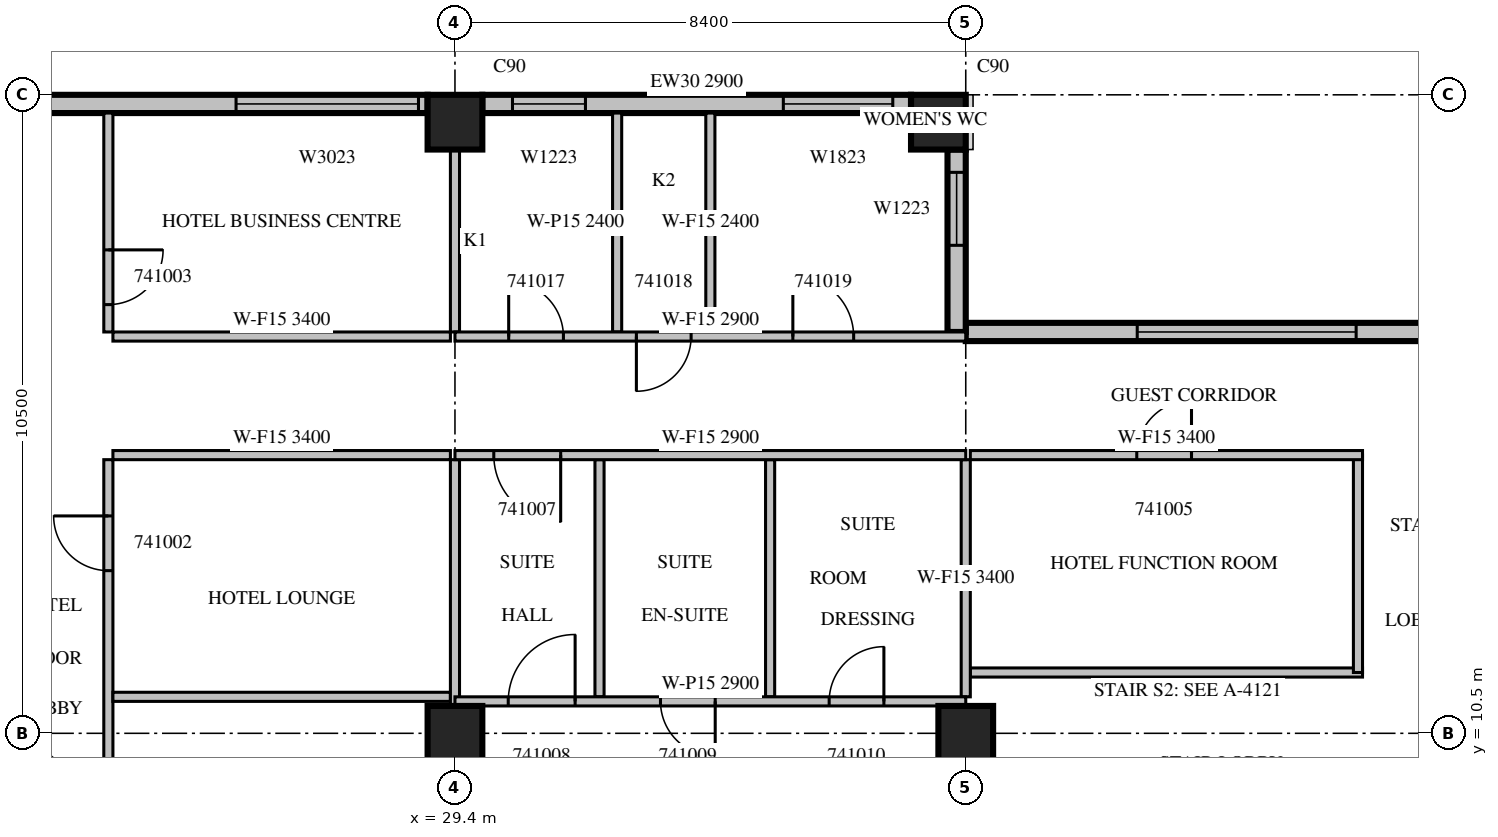
"""IFC4 building model, lengths in metres.
Left out: names, types, materials, properties, quantities, classifications, styles, units other than length and angle.
Written with IfcOpenShell. Run it as: python <this file> out.ifc"""

import sys

from ifc_helpers import new_model, si_unit, direction, frame, frame_2d, origin, origin_2d, place, context, subcontext, project, spatial, rectangle, extrude, source, transform, mapped, element, fill, save


model = new_model("IFC4")
c1 = context("Model", 3, precision=1e-05, world=origin(), true_north=direction((0.0, 1.0)))
c2 = subcontext(c1, "Body", "Model", "MODEL_VIEW")
j1 = project(units=[si_unit("LENGTHUNIT", "METRE"), si_unit("PLANEANGLEUNIT", "RADIAN")], contexts=[c1])
p1 = place(None, origin())
s1 = spatial("IfcSite", under=j1, at=p1, CompositionType="ELEMENT")
p2 = place(p1, origin())
s2 = spatial("IfcBuilding", under=s1, at=p2, CompositionType="ELEMENT")
p3 = place(p2, frame((0.0, 0.0, 189.2)))
s3 = spatial("IfcBuildingStorey", under=s2, at=p3, CompositionType="ELEMENT", Elevation=189.2)
m1 = source(origin(), c2, "Body", "SweptSolid", [
    extrude(rectangle(XDim=0.9, YDim=0.9, at=origin_2d()), origin(), (0.0, 0.0, 1.0), 3.8),
])
for number, where, z_axis, x_axis in (
    (1, (29.4, 10.5, 0.0), (0.0, 0.0, 1.0), (1.0, 0.0, 0.0)),
    (2, (37.8, 10.5, 0.0), (0.0, 0.0, 1.0), (1.0, 0.0, 0.0)),
    (3, (29.4, 20.55, 0.0), (0.0, 0.0, 1.0), (1.0, 0.0, 0.0)),
    (4, (37.35, 20.55, 0.0), (0.0, 0.0, 1.0), (1.0, 0.0, 0.0)),
):
    element("IfcColumn", number, at=place(p3, frame(where, z_axis=z_axis, x_axis=x_axis)), inside=s3, PredefinedType="COLUMN", context=c2, shape_type="MappedRepresentation", body=[
        mapped(m1, transform((0.0, 0.0, 0.0), scale=1.0)),
    ])
m2 = source(origin(), c2, "Body", "SweptSolid", [
    extrude(rectangle(XDim=21.84, YDim=0.3, at=frame_2d((10.92, 0.0))), origin(), (0.0, 0.0, 1.0), 3.4),
])
p4 = place(p3, frame((59.64, 17.1, 0.0), z_axis=(0.0, 0.0, 1.0), x_axis=(-1.0, 0.0, 0.0)))
e5 = element("IfcWall", 5, at=p4, inside=s3, PredefinedType="STANDARD", context=c2, shape_type="MappedRepresentation", body=[
    mapped(m2, transform((0.0, 0.0, 0.0), scale=1.0)),
])
m3 = source(origin(), c2, "Body", "SweptSolid", [
    extrude(rectangle(XDim=3.0, YDim=2.3, at=frame_2d((1.5, 1.15))), frame((0.0, 0.16, 0.0), z_axis=(0.0, -1.0, 0.0), x_axis=(1.0, 0.0, 0.0)), (0.0, 0.0, 1.0), 0.32),
])
p5 = place(p4, frame((0.6, 0.0, 0.6)))
e6 = element("IfcOpeningElement", 6, at=p5, cuts=e5, PredefinedType="OPENING", context=c2, shape_type="MappedRepresentation", body=[
    mapped(m3, transform((0.0, 0.0, 0.0), scale=1.0)),
])
p6 = place(p4, frame((4.8, 0.0, 0.6)))
e7 = element("IfcOpeningElement", 7, at=p6, cuts=e5, PredefinedType="OPENING", context=c2, shape_type="MappedRepresentation", body=[
    mapped(m3, transform((0.0, 0.0, 0.0), scale=1.0)),
])
m4 = source(origin(), c2, "Body", "SweptSolid", [
    extrude(rectangle(XDim=3.6, YDim=2.3, at=frame_2d((1.8, 1.15))), frame((0.0, 0.16, 0.0), z_axis=(0.0, -1.0, 0.0), x_axis=(1.0, 0.0, 0.0)), (0.0, 0.0, 1.0), 0.32),
])
p7 = place(p4, frame((9.54, 0.0, 0.6)))
e8 = element("IfcOpeningElement", 8, at=p7, cuts=e5, PredefinedType="OPENING", context=c2, shape_type="MappedRepresentation", body=[
    mapped(m4, transform((0.0, 0.0, 0.0), scale=1.0)),
])
p8 = place(p4, frame((15.42, 0.0, 0.6)))
e9 = element("IfcOpeningElement", 9, at=p8, cuts=e5, PredefinedType="OPENING", context=c2, shape_type="MappedRepresentation", body=[
    mapped(m4, transform((0.0, 0.0, 0.0), scale=1.0)),
])
m5 = source(origin(), c2, "Body", "SweptSolid", [
    extrude(rectangle(XDim=3.0, YDim=0.3, at=frame_2d((1.5, 0.0))), origin(), (0.0, 0.0, 1.0), 3.4),
])
p9 = place(p3, frame((37.65, 17.1, 0.0), z_axis=(0.0, 0.0, 1.0), x_axis=(0.0, 1.0, 0.0)))
e10 = element("IfcWall", 10, at=p9, inside=s3, PredefinedType="STANDARD", context=c2, shape_type="MappedRepresentation", body=[
    mapped(m5, transform((0.0, 0.0, 0.0), scale=1.0)),
])
m6 = source(origin(), c2, "Body", "SweptSolid", [
    extrude(rectangle(XDim=1.2, YDim=2.3, at=frame_2d((0.6, 1.15))), frame((0.0, 0.16, 0.0), z_axis=(0.0, -1.0, 0.0), x_axis=(1.0, 0.0, 0.0)), (0.0, 0.0, 1.0), 0.32),
])
p10 = place(p9, frame((1.425, 0.0, 0.6)))
e11 = element("IfcOpeningElement", 11, at=p10, cuts=e10, PredefinedType="OPENING", context=c2, shape_type="MappedRepresentation", body=[
    mapped(m6, transform((0.0, 0.0, 0.0), scale=1.0)),
])
p11 = place(p3, frame((36.9, 20.85, 0.0), z_axis=(0.0, 0.0, 1.0), x_axis=(-1.0, 0.0, 0.0)))
e12 = element("IfcWall", 12, at=p11, inside=s3, PredefinedType="STANDARD", context=c2, shape_type="SweptSolid", body=[
    extrude(rectangle(XDim=7.05, YDim=0.3, at=frame_2d((3.525, 0.0))), origin(), (0.0, 0.0, 1.0), 2.9),
])
m7 = source(origin(), c2, "Body", "SweptSolid", [
    extrude(rectangle(XDim=1.8, YDim=2.3, at=frame_2d((0.9, 1.15))), frame((0.0, 0.16, 0.0), z_axis=(0.0, -1.0, 0.0), x_axis=(1.0, 0.0, 0.0)), (0.0, 0.0, 1.0), 0.32),
])
p12 = place(p11, frame((0.3, 0.0, 0.6)))
e13 = element("IfcOpeningElement", 13, at=p12, cuts=e12, PredefinedType="OPENING", context=c2, shape_type="MappedRepresentation", body=[
    mapped(m7, transform((0.0, 0.0, 0.0), scale=1.0)),
])
p13 = place(p11, frame((5.354, 0.0, 0.6)))
e14 = element("IfcOpeningElement", 14, at=p13, cuts=e12, PredefinedType="OPENING", context=c2, shape_type="MappedRepresentation", body=[
    mapped(m6, transform((0.0, 0.0, 0.0), scale=1.0)),
])
m8 = source(origin(), c2, "Body", "SweptSolid", [
    extrude(rectangle(XDim=7.15, YDim=0.3, at=frame_2d((3.575, 0.0))), origin(), (0.0, 0.0, 1.0), 3.4),
])
p14 = place(p3, frame((28.95, 20.85, 0.0), z_axis=(0.0, 0.0, 1.0), x_axis=(-1.0, 0.0, 0.0)))
e15 = element("IfcWall", 15, at=p14, inside=s3, PredefinedType="STANDARD", context=c2, shape_type="MappedRepresentation", body=[
    mapped(m8, transform((0.0, 0.0, 0.0), scale=1.0)),
])
p15 = place(p14, frame((0.15, 0.0, 0.6)))
e16 = element("IfcOpeningElement", 16, at=p15, cuts=e15, PredefinedType="OPENING", context=c2, shape_type="MappedRepresentation", body=[
    mapped(m3, transform((0.0, 0.0, 0.0), scale=1.0)),
])
m9 = source(origin(), c2, "Body", "SweptSolid", [
    extrude(rectangle(XDim=11.525, YDim=0.15, at=frame_2d((5.763, 0.0))), origin(), (0.0, 0.0, 1.0), 2.4),
])
p16 = place(p3, frame((23.7, 15.0, 0.0), z_axis=(0.0, 0.0, 1.0), x_axis=(0.0, -1.0, 0.0)))
e17 = element("IfcWall", 17, at=p16, inside=s3, PredefinedType="PARTITIONING", context=c2, shape_type="MappedRepresentation", body=[
    mapped(m9, transform((0.0, 0.0, 0.0), scale=1.0)),
])
m10 = source(origin(), c2, "Body", "SweptSolid", [
    extrude(rectangle(XDim=0.9, YDim=2.1, at=frame_2d((0.45, 1.05))), frame((0.0, 0.085, 0.0), z_axis=(0.0, -1.0, 0.0), x_axis=(1.0, 0.0, 0.0)), (0.0, 0.0, 1.0), 0.17),
])
p17 = place(p16, frame((7.562, 0.0, 0.0)))
e18 = element("IfcOpeningElement", 18, at=p17, cuts=e17, PredefinedType="OPENING", context=c2, shape_type="MappedRepresentation", body=[
    mapped(m10, transform((0.0, 0.0, 0.0), scale=1.0)),
])
p18 = place(p16, frame((0.925, 0.0, 0.0)))
e19 = element("IfcOpeningElement", 19, at=p18, cuts=e17, PredefinedType="OPENING", context=c2, shape_type="MappedRepresentation", body=[
    mapped(m10, transform((0.0, 0.0, 0.0), scale=1.0)),
])
m11 = source(origin(), c2, "Body", "SweptSolid", [
    extrude(rectangle(XDim=3.6, YDim=0.15, at=frame_2d((1.8, 0.0))), origin(), (0.0, 0.0, 1.0), 3.4),
])
p19 = place(p3, frame((23.7, 20.7, 0.0), z_axis=(0.0, 0.0, 1.0), x_axis=(0.0, -1.0, 0.0)))
e20 = element("IfcWall", 20, at=p19, inside=s3, PredefinedType="PARTITIONING", context=c2, shape_type="MappedRepresentation", body=[
    mapped(m11, transform((0.0, 0.0, 0.0), scale=1.0)),
])
p20 = place(p19, frame((2.25, 0.0, 0.0)))
e21 = element("IfcOpeningElement", 21, at=p20, cuts=e20, PredefinedType="OPENING", context=c2, shape_type="MappedRepresentation", body=[
    mapped(m10, transform((0.0, 0.0, 0.0), scale=1.0)),
])
m12 = source(origin(), c2, "Body", "SweptSolid", [
    extrude(rectangle(XDim=5.55, YDim=0.15, at=frame_2d((2.775, 0.0))), origin(), (0.0, 0.0, 1.0), 3.4),
])
for number, where, z_axis, x_axis in (
    (22, (29.325, 11.1, 0.0), (0.0, 0.0, 1.0), (-1.0, 0.0, 0.0)),
    (23, (29.325, 15.075, 0.0), (0.0, 0.0, 1.0), (-1.0, 0.0, 0.0)),
    (24, (23.775, 17.025, 0.0), (0.0, 0.0, 1.0), (1.0, 0.0, 0.0)),
):
    element("IfcWall", number, at=place(p3, frame(where, z_axis=z_axis, x_axis=x_axis)), inside=s3, PredefinedType="PARTITIONING", context=c2, shape_type="MappedRepresentation", body=[
        mapped(m12, transform((0.0, 0.0, 0.0), scale=1.0)),
    ])
m13 = source(origin(), c2, "Body", "SweptSolid", [
    extrude(rectangle(XDim=4.051, YDim=0.15, at=frame_2d((2.026, 0.0))), origin(), (0.0, 0.0, 1.0), 3.4),
])
p21 = place(p3, frame((29.4, 10.949, 0.0), z_axis=(0.0, 0.0, 1.0), x_axis=(0.0, 1.0, 0.0)))
e25 = element("IfcWall", 25, at=p21, inside=s3, PredefinedType="PARTITIONING", context=c2, shape_type="MappedRepresentation", body=[
    mapped(m13, transform((0.0, 0.0, 0.0), scale=1.0)),
])
m14 = source(origin(), c2, "Body", "SweptSolid", [
    extrude(rectangle(XDim=3.001, YDim=0.15, at=frame_2d((1.5, 0.0))), origin(), (0.0, 0.0, 1.0), 3.4),
])
p22 = place(p3, frame((29.4, 17.1, 0.0), z_axis=(0.0, 0.0, 1.0), x_axis=(0.0, 1.0, 0.0)))
e26 = element("IfcWall", 26, at=p22, inside=s3, PredefinedType="PARTITIONING", context=c2, shape_type="MappedRepresentation", body=[
    mapped(m14, transform((0.0, 0.0, 0.0), scale=1.0)),
])
m15 = source(origin(), c2, "Body", "SweptSolid", [
    extrude(rectangle(XDim=6.45, YDim=0.15, at=frame_2d((3.225, 0.0))), origin(), (0.0, 0.0, 1.0), 3.4),
])
p23 = place(p3, frame((37.875, 11.5, 0.0), z_axis=(0.0, 0.0, 1.0), x_axis=(1.0, 0.0, 0.0)))
e27 = element("IfcWall", 27, at=p23, inside=s3, PredefinedType="PARTITIONING", context=c2, shape_type="MappedRepresentation", body=[
    mapped(m15, transform((0.0, 0.0, 0.0), scale=1.0)),
])
m16 = source(origin(), c2, "Body", "SweptSolid", [
    extrude(rectangle(XDim=3.575, YDim=0.15, at=frame_2d((1.788, 0.0))), origin(), (0.0, 0.0, 1.0), 3.4),
])
p24 = place(p3, frame((44.25, 11.5, 0.0), z_axis=(0.0, 0.0, 1.0), x_axis=(0.0, 1.0, 0.0)))
e28 = element("IfcWall", 28, at=p24, inside=s3, PredefinedType="PARTITIONING", context=c2, shape_type="MappedRepresentation", body=[
    mapped(m16, transform((0.0, 0.0, 0.0), scale=1.0)),
])
p25 = place(p3, frame((44.325, 15.075, 0.0), z_axis=(0.0, 0.0, 1.0), x_axis=(-1.0, 0.0, 0.0)))
e29 = element("IfcWall", 29, at=p25, inside=s3, PredefinedType="PARTITIONING", context=c2, shape_type="MappedRepresentation", body=[
    mapped(m15, transform((0.0, 0.0, 0.0), scale=1.0)),
])
p26 = place(p25, frame((2.812, 0.0, 0.0)))
e30 = element("IfcOpeningElement", 30, at=p26, cuts=e29, PredefinedType="OPENING", context=c2, shape_type="MappedRepresentation", body=[
    mapped(m10, transform((0.0, 0.0, 0.0), scale=1.0)),
])
m17 = source(origin(), c2, "Body", "SweptSolid", [
    extrude(rectangle(XDim=3.9, YDim=0.15, at=frame_2d((1.95, 0.0))), origin(), (0.0, 0.0, 1.0), 3.4),
])
for number, where, z_axis, x_axis in (
    (31, (31.777, 11.1, 0.0), (0.0, 0.0, 1.0), (0.0, 1.0, 0.0)),
    (32, (34.583, 11.1, 0.0), (0.0, 0.0, 1.0), (0.0, 1.0, 0.0)),
    (33, (37.8, 11.1, 0.0), (0.0, 0.0, 1.0), (0.0, 1.0, 0.0)),
):
    element("IfcWall", number, at=place(p3, frame(where, z_axis=z_axis, x_axis=x_axis)), inside=s3, PredefinedType="PARTITIONING", context=c2, shape_type="MappedRepresentation", body=[
        mapped(m17, transform((0.0, 0.0, 0.0), scale=1.0)),
    ])
m18 = source(origin(), c2, "Body", "SweptSolid", [
    extrude(rectangle(XDim=8.4, YDim=0.15, at=frame_2d((4.2, 0.0))), origin(), (0.0, 0.0, 1.0), 2.9),
])
p27 = place(p3, frame((37.8, 11.025, 0.0), z_axis=(0.0, 0.0, 1.0), x_axis=(-1.0, 0.0, 0.0)))
e34 = element("IfcWall", 34, at=p27, inside=s3, PredefinedType="PARTITIONING", context=c2, shape_type="MappedRepresentation", body=[
    mapped(m18, transform((0.0, 0.0, 0.0), scale=1.0)),
])
m19 = source(origin(), c2, "Body", "SweptSolid", [
    extrude(rectangle(XDim=1.1, YDim=2.1, at=frame_2d((0.55, 1.05))), frame((0.0, 0.085, 0.0), z_axis=(0.0, -1.0, 0.0), x_axis=(1.0, 0.0, 0.0)), (0.0, 0.0, 1.0), 0.17),
])
p28 = place(p27, frame((6.424, 0.0, 0.0)))
e35 = element("IfcOpeningElement", 35, at=p28, cuts=e34, PredefinedType="OPENING", context=c2, shape_type="MappedRepresentation", body=[
    mapped(m19, transform((0.0, 0.0, 0.0), scale=1.0)),
])
p29 = place(p27, frame((4.12, 0.0, 0.0)))
e36 = element("IfcOpeningElement", 36, at=p29, cuts=e34, PredefinedType="OPENING", context=c2, shape_type="MappedRepresentation", body=[
    mapped(m10, transform((0.0, 0.0, 0.0), scale=1.0)),
])
p30 = place(p27, frame((1.346, 0.0, 0.0)))
e37 = element("IfcOpeningElement", 37, at=p30, cuts=e34, PredefinedType="OPENING", context=c2, shape_type="MappedRepresentation", body=[
    mapped(m10, transform((0.0, 0.0, 0.0), scale=1.0)),
])
m20 = source(origin(), c2, "Body", "SweptSolid", [
    extrude(rectangle(XDim=3.6, YDim=0.15, at=frame_2d((1.8, 0.0))), origin(), (0.0, 0.0, 1.0), 2.4),
])
for number, where, z_axis, x_axis in (
    (38, (32.067, 20.7, 0.0), (0.0, 0.0, 1.0), (0.0, -1.0, 0.0)),
    (39, (33.6, 17.1, 0.0), (0.0, 0.0, 1.0), (0.0, 1.0, 0.0)),
):
    element("IfcWall", number, at=place(p3, frame(where, z_axis=z_axis, x_axis=x_axis)), inside=s3, PredefinedType="PARTITIONING", context=c2, shape_type="MappedRepresentation", body=[
        mapped(m20, transform((0.0, 0.0, 0.0), scale=1.0)),
    ])
p31 = place(p3, frame((37.8, 15.075, 0.0), z_axis=(0.0, 0.0, 1.0), x_axis=(-1.0, 0.0, 0.0)))
e40 = element("IfcWall", 40, at=p31, inside=s3, PredefinedType="PARTITIONING", context=c2, shape_type="MappedRepresentation", body=[
    mapped(m18, transform((0.0, 0.0, 0.0), scale=1.0)),
])
p32 = place(p31, frame((6.662, 0.0, 0.0)))
e41 = element("IfcOpeningElement", 41, at=p32, cuts=e40, PredefinedType="OPENING", context=c2, shape_type="MappedRepresentation", body=[
    mapped(m19, transform((0.0, 0.0, 0.0), scale=1.0)),
])
p33 = place(p3, frame((29.4, 17.025, 0.0), z_axis=(0.0, 0.0, 1.0), x_axis=(1.0, 0.0, 0.0)))
e42 = element("IfcWall", 42, at=p33, inside=s3, PredefinedType="PARTITIONING", context=c2, shape_type="MappedRepresentation", body=[
    mapped(m18, transform((0.0, 0.0, 0.0), scale=1.0)),
])
p34 = place(p33, frame((0.883, 0.0, 0.0)))
e43 = element("IfcOpeningElement", 43, at=p34, cuts=e42, PredefinedType="OPENING", context=c2, shape_type="MappedRepresentation", body=[
    mapped(m10, transform((0.0, 0.0, 0.0), scale=1.0)),
])
p35 = place(p33, frame((2.983, 0.0, 0.0)))
e44 = element("IfcOpeningElement", 44, at=p35, cuts=e42, PredefinedType="OPENING", context=c2, shape_type="MappedRepresentation", body=[
    mapped(m10, transform((0.0, 0.0, 0.0), scale=1.0)),
])
m21 = source(origin(), c2, "Body", "SweptSolid", [
    extrude(rectangle(XDim=1.0, YDim=2.1, at=frame_2d((0.5, 1.05))), frame((0.0, 0.085, 0.0), z_axis=(0.0, -1.0, 0.0), x_axis=(1.0, 0.0, 0.0)), (0.0, 0.0, 1.0), 0.17),
])
p36 = place(p33, frame((5.557, 0.0, 0.0)))
e45 = element("IfcOpeningElement", 45, at=p36, cuts=e42, PredefinedType="OPENING", context=c2, shape_type="MappedRepresentation", body=[
    mapped(m21, transform((0.0, 0.0, 0.0), scale=1.0)),
])
m22 = source(origin(), c2, "Body", "SweptSolid", [
    extrude(rectangle(XDim=3.6, YDim=2.3, at=frame_2d((1.8, 1.15))), frame((0.0, 0.03, 0.0), z_axis=(0.0, -1.0, 0.0), x_axis=(1.0, 0.0, 0.0)), (0.0, 0.0, 1.0), 0.06),
])
p37 = place(p8, origin())
e46 = element("IfcWindow", 46, at=p37, inside=s3, PartitioningType="SINGLE_PANEL", PredefinedType="WINDOW", context=c2, shape_type="MappedRepresentation", body=[
    mapped(m22, transform((0.0, 0.0, 0.0), scale=1.0)),
])
fill(e9, e46)
m23 = source(origin(), c2, "Body", "SweptSolid", [
    extrude(rectangle(XDim=1.2, YDim=2.3, at=frame_2d((0.6, 1.15))), frame((0.0, 0.03, 0.0), z_axis=(0.0, -1.0, 0.0), x_axis=(1.0, 0.0, 0.0)), (0.0, 0.0, 1.0), 0.06),
])
p38 = place(p10, origin())
e47 = element("IfcWindow", 47, at=p38, inside=s3, PartitioningType="SINGLE_PANEL", PredefinedType="WINDOW", context=c2, shape_type="MappedRepresentation", body=[
    mapped(m23, transform((0.0, 0.0, 0.0), scale=1.0)),
])
fill(e11, e47)
m24 = source(origin(), c2, "Body", "SweptSolid", [
    extrude(rectangle(XDim=1.8, YDim=2.3, at=frame_2d((0.9, 1.15))), frame((0.0, 0.03, 0.0), z_axis=(0.0, -1.0, 0.0), x_axis=(1.0, 0.0, 0.0)), (0.0, 0.0, 1.0), 0.06),
])
p39 = place(p12, origin())
e48 = element("IfcWindow", 48, at=p39, inside=s3, PartitioningType="SINGLE_PANEL", PredefinedType="WINDOW", context=c2, shape_type="MappedRepresentation", body=[
    mapped(m24, transform((0.0, 0.0, 0.0), scale=1.0)),
])
fill(e13, e48)
p40 = place(p13, origin())
e49 = element("IfcWindow", 49, at=p40, inside=s3, PartitioningType="SINGLE_PANEL", PredefinedType="WINDOW", context=c2, shape_type="MappedRepresentation", body=[
    mapped(m23, transform((0.0, 0.0, 0.0), scale=1.0)),
])
fill(e14, e49)
m25 = source(origin(), c2, "Body", "SweptSolid", [
    extrude(rectangle(XDim=3.0, YDim=2.3, at=frame_2d((1.5, 1.15))), frame((0.0, 0.03, 0.0), z_axis=(0.0, -1.0, 0.0), x_axis=(1.0, 0.0, 0.0)), (0.0, 0.0, 1.0), 0.06),
])
p41 = place(p15, origin())
e50 = element("IfcWindow", 50, at=p41, inside=s3, PartitioningType="SINGLE_PANEL", PredefinedType="WINDOW", context=c2, shape_type="MappedRepresentation", body=[
    mapped(m25, transform((0.0, 0.0, 0.0), scale=1.0)),
])
fill(e16, e50)
m26 = source(origin(), c2, "Body", "SweptSolid", [
    extrude(rectangle(XDim=0.9, YDim=2.1, at=frame_2d((0.45, 1.05))), frame((0.0, 0.025, 0.0), z_axis=(0.0, -1.0, 0.0), x_axis=(1.0, 0.0, 0.0)), (0.0, 0.0, 1.0), 0.05),
])
p42 = place(p18, origin())
e51 = element("IfcDoor", 51, at=p42, inside=s3, OperationType="SINGLE_SWING_RIGHT", PredefinedType="DOOR", context=c2, shape_type="MappedRepresentation", body=[
    mapped(m26, transform((0.0, 0.0, 0.0), scale=1.0)),
])
fill(e19, e51)
p43 = place(p20, origin())
e52 = element("IfcDoor", 52, at=p43, inside=s3, OperationType="SINGLE_SWING_LEFT", PredefinedType="DOOR", context=c2, shape_type="MappedRepresentation", body=[
    mapped(m26, transform((0.0, 0.0, 0.0), scale=1.0)),
])
fill(e21, e52)
p44 = place(p26, origin())
e53 = element("IfcDoor", 53, at=p44, inside=s3, OperationType="SINGLE_SWING_RIGHT", PredefinedType="DOOR", context=c2, shape_type="MappedRepresentation", body=[
    mapped(m26, transform((0.0, 0.0, 0.0), scale=1.0)),
])
fill(e30, e53)
m27 = source(origin(), c2, "Body", "SweptSolid", [
    extrude(rectangle(XDim=1.1, YDim=2.1, at=frame_2d((0.55, 1.05))), frame((0.0, 0.025, 0.0), z_axis=(0.0, -1.0, 0.0), x_axis=(1.0, 0.0, 0.0)), (0.0, 0.0, 1.0), 0.05),
])
p45 = place(p32, origin())
e54 = element("IfcDoor", 54, at=p45, inside=s3, OperationType="SINGLE_SWING_LEFT", PredefinedType="DOOR", context=c2, shape_type="MappedRepresentation", body=[
    mapped(m27, transform((0.0, 0.0, 0.0), scale=1.0)),
])
fill(e41, e54)
p46 = place(p28, origin())
e55 = element("IfcDoor", 55, at=p46, inside=s3, OperationType="SINGLE_SWING_RIGHT", PredefinedType="DOOR", context=c2, shape_type="MappedRepresentation", body=[
    mapped(m27, transform((0.0, 0.0, 0.0), scale=1.0)),
])
fill(e35, e55)
p47 = place(p29, origin())
e56 = element("IfcDoor", 56, at=p47, inside=s3, OperationType="SINGLE_SWING_LEFT", PredefinedType="DOOR", context=c2, shape_type="MappedRepresentation", body=[
    mapped(m26, transform((0.0, 0.0, 0.0), scale=1.0)),
])
fill(e36, e56)
p48 = place(p30, origin())
e57 = element("IfcDoor", 57, at=p48, inside=s3, OperationType="SINGLE_SWING_RIGHT", PredefinedType="DOOR", context=c2, shape_type="MappedRepresentation", body=[
    mapped(m26, transform((0.0, 0.0, 0.0), scale=1.0)),
])
fill(e37, e57)
p49 = place(p34, origin())
e58 = element("IfcDoor", 58, at=p49, inside=s3, OperationType="SINGLE_SWING_LEFT", PredefinedType="DOOR", context=c2, shape_type="MappedRepresentation", body=[
    mapped(m26, transform((0.0, 0.0, 0.0), scale=1.0)),
])
fill(e43, e58)
p50 = place(p35, origin())
e59 = element("IfcDoor", 59, at=p50, inside=s3, OperationType="SINGLE_SWING_RIGHT", PredefinedType="DOOR", context=c2, shape_type="MappedRepresentation", body=[
    mapped(m26, transform((0.0, 0.0, 0.0), scale=1.0)),
])
fill(e44, e59)
m28 = source(origin(), c2, "Body", "SweptSolid", [
    extrude(rectangle(XDim=1.0, YDim=2.1, at=frame_2d((0.5, 1.05))), frame((0.0, 0.025, 0.0), z_axis=(0.0, -1.0, 0.0), x_axis=(1.0, 0.0, 0.0)), (0.0, 0.0, 1.0), 0.05),
])
p51 = place(p36, origin())
e60 = element("IfcDoor", 60, at=p51, inside=s3, OperationType="SINGLE_SWING_LEFT", PredefinedType="DOOR", context=c2, shape_type="MappedRepresentation", body=[
    mapped(m28, transform((0.0, 0.0, 0.0), scale=1.0)),
])
fill(e45, e60)
save(model, sys.argv[1])
